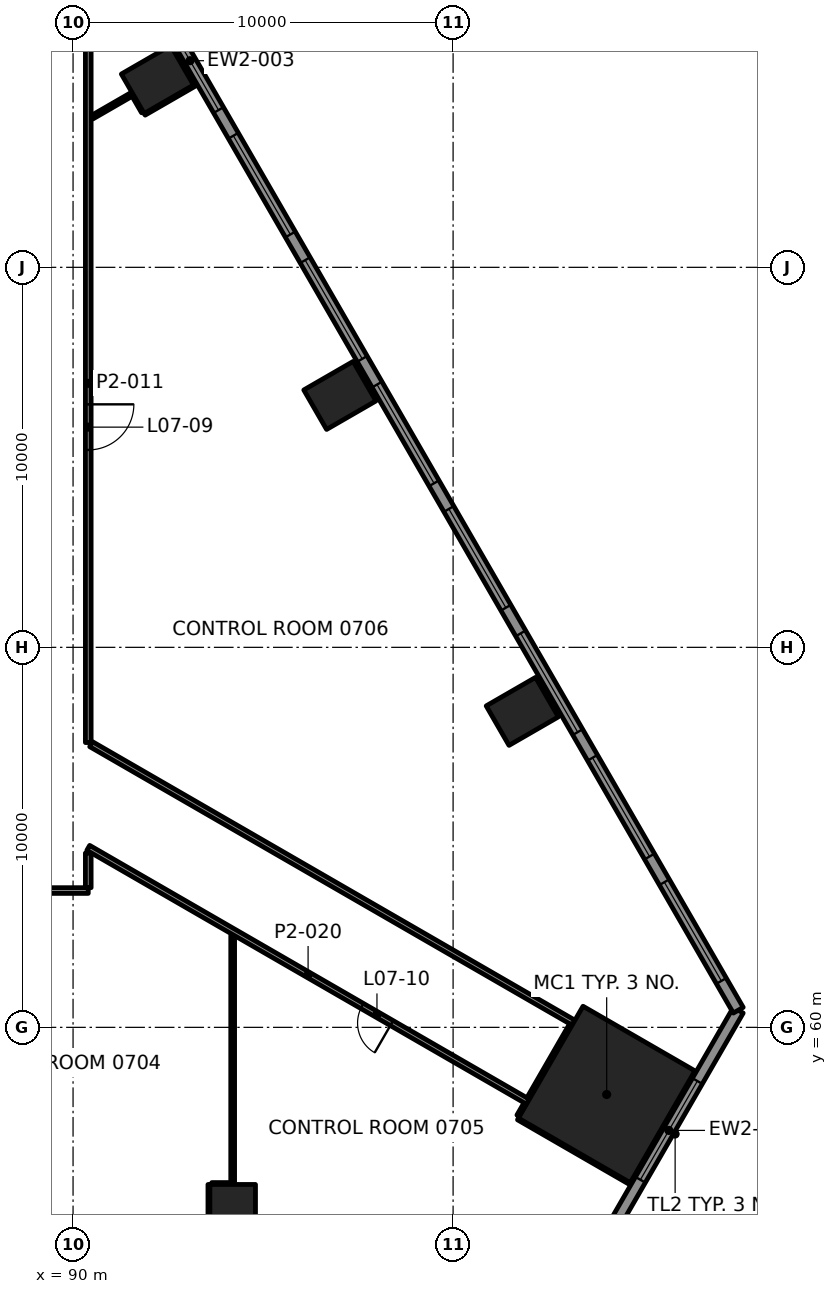
"""IFC4 building model, lengths in metres.
Left out: names, types, materials, properties, quantities, classifications, styles, units other than length and angle.
Written with IfcOpenShell. Run it as: python <this file> out.ifc"""

import sys

from ifc_helpers import new_model, si_unit, direction, frame, frame_2d, origin, origin_2d, place, context, subcontext, project, spatial, rectangle, extrude, element, fill, save


model = new_model("IFC4")
c1 = context("Model", 3, precision=1e-05, world=origin(), true_north=direction((0.0, 1.0)))
c2 = subcontext(c1, "Body", "Model", "MODEL_VIEW")
j1 = project(units=[si_unit("LENGTHUNIT", "METRE"), si_unit("PLANEANGLEUNIT", "RADIAN")], contexts=[c1])
p1 = place(None, origin())
s1 = spatial("IfcSite", under=j1, at=p1, CompositionType="ELEMENT")
p2 = place(p1, origin())
s2 = spatial("IfcBuilding", under=s1, at=p2, CompositionType="ELEMENT")
p3 = place(p2, frame((0.0, 0.0, 35.5)))
s3 = spatial("IfcBuildingStorey", under=s2, at=p3, CompositionType="ELEMENT", Elevation=35.5)
p4 = place(p3, frame((104.041, 58.233, 0.0), z_axis=(0.0, 0.0, 1.0), x_axis=(0.5, 0.866025403784, 0.0)))
e1 = element("IfcColumn", 1, at=p4, inside=s3, PredefinedType="COLUMN", context=c2, shape_type="SweptSolid", body=[
    extrude(rectangle(XDim=3.4, YDim=3.4, at=origin_2d()), origin(), (0.0, 0.0, 1.0), 4.5),
])
for number, where, z_axis, x_axis in (
    (2, (94.2, 55.115, -0.0), (0.0, 0.0, 1.0), (1.0, 0.0, 0.0)),
    (3, (101.821, 68.315, -0.0), (0.0, 0.0, 1.0), (-0.5, 0.866, 0.0)),
    (4, (97.021, 76.628, -0.0), (0.0, 0.0, 1.0), (-0.5, 0.866, 0.0)),
    (5, (92.22, 84.942, -0.0), (0.0, 0.0, 1.0), (-0.5, 0.866, 0.0)),
):
    element("IfcColumn", number, at=place(p3, frame(where, z_axis=z_axis, x_axis=x_axis)), inside=s3, PredefinedType="COLUMN", context=c2, shape_type="SweptSolid", body=[
        extrude(rectangle(XDim=1.2, YDim=1.5, at=origin_2d()), origin(), (0.0, 0.0, 1.0), 4.5),
    ])
p5 = place(p3, frame((93.65, 55.865, 0.0), z_axis=(0.0, 0.0, 1.0), x_axis=(1.0, 0.0, 0.0)))
e6 = element("IfcWall", 6, at=p5, inside=s3, PredefinedType="PARTITIONING", context=c2, shape_type="SweptSolid", body=[
    extrude(rectangle(XDim=0.499, YDim=0.1, at=frame_2d((0.25, 0.0))), origin(), (0.0, 0.0, 1.0), 3.7),
])
p6 = place(p3, frame((90.4, 63.6, 0.0), z_axis=(0.0, 0.0, 1.0), x_axis=(-1.0, 0.0, 0.0)))
e7 = element("IfcWall", 7, at=p6, inside=s3, PredefinedType="PARTITIONING", context=c2, shape_type="SweptSolid", body=[
    extrude(rectangle(XDim=30.799, YDim=0.15, at=frame_2d((15.4, 0.0))), origin(), (0.0, 0.0, 1.0), 3.7),
])
p7 = place(p6, frame((3.751, 0.0, 0.0)))
e8 = element("IfcOpeningElement", 8, at=p7, cuts=e7, PredefinedType="OPENING", context=c2, shape_type="SweptSolid", body=[
    extrude(rectangle(XDim=0.9, YDim=2.1, at=frame_2d((0.45, 1.05))), frame((0.0, 0.085, 0.0), z_axis=(0.0, -1.0, 0.0), x_axis=(1.0, 0.0, 0.0)), (0.0, 0.0, 1.0), 0.17),
])
p8 = place(p6, frame((14.8, 0.0, 0.0)))
e9 = element("IfcOpeningElement", 9, at=p8, cuts=e7, PredefinedType="OPENING", context=c2, shape_type="SweptSolid", body=[
    extrude(rectangle(XDim=1.2, YDim=2.1, at=frame_2d((0.6, 1.05))), frame((0.0, 0.085, 0.0), z_axis=(0.0, -1.0, 0.0), x_axis=(1.0, 0.0, 0.0)), (0.0, 0.0, 1.0), 0.17),
])
p9 = place(p6, frame((25.998, 0.0, 0.0)))
e10 = element("IfcOpeningElement", 10, at=p9, cuts=e7, PredefinedType="OPENING", context=c2, shape_type="SweptSolid", body=[
    extrude(rectangle(XDim=1.2, YDim=2.1, at=frame_2d((0.6, 1.05))), frame((0.0, 0.085, 0.0), z_axis=(0.0, -1.0, 0.0), x_axis=(1.0, 0.0, 0.0)), (0.0, 0.0, 1.0), 0.17),
])
p10 = place(p3, frame((91.871, 84.048, 0.0), z_axis=(0.0, 0.0, 1.0), x_axis=(0.866026058841, 0.499998865407, 0.0)))
e11 = element("IfcWall", 11, at=p10, inside=s3, PredefinedType="PARTITIONING", context=c2, shape_type="SweptSolid", body=[
    extrude(rectangle(XDim=1.708, YDim=0.1, at=frame_2d((0.854, 0.0))), origin(), (0.0, 0.0, 1.0), 3.465),
])
p11 = place(p3, frame((90.501, 83.95, 0.0), z_axis=(0.0, 0.0, 1.0), x_axis=(0.866057204957, 0.499944914708, 0.0)))
e12 = element("IfcWall", 12, at=p11, inside=s3, PredefinedType="PARTITIONING", context=c2, shape_type="SweptSolid", body=[
    extrude(rectangle(XDim=1.235, YDim=0.1, at=frame_2d((0.618, 0.0))), origin(), (0.0, 0.0, 1.0), 3.7),
])
p12 = place(p3, frame((101.744, 57.655, 0.0), z_axis=(0.0, 0.0, 1.0), x_axis=(0.500136362069, 0.865946660792, 0.0)))
e13 = element("IfcWall", 13, at=p12, inside=s3, PredefinedType="PARTITIONING", context=c2, shape_type="SweptSolid", body=[
    extrude(rectangle(XDim=0.375, YDim=0.15, at=frame_2d((0.187, 0.0))), origin(), (0.0, 0.0, 1.0), 3.7),
])
p13 = place(p3, frame((94.2, 55.866, 0.0), z_axis=(0.0, 0.0, 1.0), x_axis=(0.0, 1.0, 0.0)))
e14 = element("IfcWall", 14, at=p13, inside=s3, PredefinedType="PARTITIONING", context=c2, shape_type="SweptSolid", body=[
    extrude(rectangle(XDim=6.547, YDim=0.1, at=frame_2d((3.273, 0.0))), origin(), (0.0, 0.0, 1.0), 3.7),
])
p14 = place(p3, frame((93.6, 54.155, 0.0), z_axis=(0.0, 0.0, 1.0), x_axis=(0.0, 1.0, 0.0)))
e15 = element("IfcWall", 15, at=p14, inside=s3, PredefinedType="PARTITIONING", context=c2, shape_type="SweptSolid", body=[
    extrude(rectangle(XDim=1.71, YDim=0.1, at=frame_2d((0.855, 0.0))), origin(), (0.0, 0.0, 1.0), 3.7),
])
p15 = place(p3, frame((90.4, 63.675, 0.0), z_axis=(0.0, 0.0, 1.0), x_axis=(0.0, 1.0, 0.0)))
e16 = element("IfcWall", 16, at=p15, inside=s3, PredefinedType="PARTITIONING", context=c2, shape_type="SweptSolid", body=[
    extrude(rectangle(XDim=0.912, YDim=0.15, at=frame_2d((0.456, 0.0))), origin(), (0.0, 0.0, 1.0), 3.7),
])
p16 = place(p3, frame((90.4, 86.399, 0.0), z_axis=(0.0, 0.0, 1.0), x_axis=(0.0, -1.0, 0.0)))
e17 = element("IfcWall", 17, at=p16, inside=s3, PredefinedType="PARTITIONING", context=c2, shape_type="SweptSolid", body=[
    extrude(rectangle(XDim=18.905, YDim=0.15, at=frame_2d((9.453, 0.0))), origin(), (0.0, 0.0, 1.0), 3.7),
])
p17 = place(p16, frame((10.005, 0.0, 0.0)))
e18 = element("IfcOpeningElement", 18, at=p17, cuts=e17, PredefinedType="OPENING", context=c2, shape_type="SweptSolid", body=[
    extrude(rectangle(XDim=1.2, YDim=2.1, at=frame_2d((0.6, 1.05))), frame((0.0, 0.085, 0.0), z_axis=(0.0, -1.0, 0.0), x_axis=(1.0, 0.0, 0.0)), (0.0, 0.0, 1.0), 0.17),
])
p18 = place(p3, frame((91.846, 84.092, 0.0), z_axis=(0.0, 0.0, 1.0), x_axis=(-0.500244977835, 0.865883919559, 0.0)))
e19 = element("IfcWall", 19, at=p18, inside=s3, PredefinedType="PARTITIONING", context=c2, shape_type="SweptSolid", body=[
    extrude(rectangle(XDim=0.499, YDim=0.1, at=frame_2d((0.25, 0.0))), origin(), (0.0, 0.0, 1.0), 3.7),
])
p19 = place(p3, frame((103.168, 60.123, 0.0), z_axis=(0.0, 0.0, 1.0), x_axis=(-0.866022484069, 0.500005057062, 0.0)))
e20 = element("IfcWall", 20, at=p19, inside=s3, PredefinedType="PARTITIONING", context=c2, shape_type="SweptSolid", body=[
    extrude(rectangle(XDim=14.657, YDim=0.15, at=frame_2d((7.329, 0.0))), origin(), (0.0, 0.0, 1.0), 3.7),
])
p20 = place(p3, frame((101.969, 58.044, 0.0), z_axis=(0.0, 0.0, 1.0), x_axis=(-0.866027935033, 0.499995615723, 0.0)))
e21 = element("IfcWall", 21, at=p20, inside=s3, PredefinedType="PARTITIONING", context=c2, shape_type="SweptSolid", body=[
    extrude(rectangle(XDim=13.358, YDim=0.15, at=frame_2d((6.679, 0.0))), origin(), (0.0, 0.0, 1.0), 3.547),
])
p21 = place(p20, frame((4.137, 0.0, 0.0)))
e22 = element("IfcOpeningElement", 22, at=p21, cuts=e21, PredefinedType="OPENING", context=c2, shape_type="SweptSolid", body=[
    extrude(rectangle(XDim=0.9, YDim=2.1, at=frame_2d((0.45, 1.05))), frame((0.0, 0.085, 0.0), z_axis=(0.0, -1.0, 0.0), x_axis=(1.0, 0.0, 0.0)), (0.0, 0.0, 1.0), 0.17),
])
p22 = place(p3, frame((104.802, 55.831, 0.0), z_axis=(0.0, 0.0, 1.0), x_axis=(-0.866014251095, 0.500019316528, 0.0)))
e23 = element("IfcWall", 23, at=p22, inside=s3, PredefinedType="PARTITIONING", context=c2, shape_type="SweptSolid", body=[
    extrude(rectangle(XDim=3.559, YDim=0.1, at=frame_2d((1.78, 0.0))), origin(), (0.0, 0.0, 1.0), 3.7),
])
p23 = place(p3, frame((102.007, 58.109, 0.0), z_axis=(0.0, 0.0, 1.0), x_axis=(0.499979232204, 0.866037393745, 0.0)))
e24 = element("IfcWall", 24, at=p23, inside=s3, PredefinedType="PARTITIONING", context=c2, shape_type="SweptSolid", body=[
    extrude(rectangle(XDim=2.25, YDim=0.15, at=frame_2d((1.125, 0.0))), origin(), (0.0, 0.0, 1.0), 3.547),
])
p24 = place(p3, frame((103.852, 54.125, 0.0), z_axis=(0.0, 0.0, 1.0), x_axis=(0.500000231294, 0.866025270247, 0.0)))
e25 = element("IfcWall", 25, at=p24, inside=s3, PredefinedType="SOLIDWALL", context=c2, shape_type="SweptSolid", body=[
    extrude(rectangle(XDim=7.304, YDim=0.3, at=frame_2d((3.652, 0.0))), origin(), (0.0, 0.0, 1.0), 4.3),
])
p25 = place(p24, frame((2.152, 0.0, 0.8)))
e26 = element("IfcOpeningElement", 26, at=p25, cuts=e25, PredefinedType="OPENING", context=c2, shape_type="SweptSolid", body=[
    extrude(rectangle(XDim=3.0, YDim=2.4, at=frame_2d((1.5, 1.2))), frame((0.0, 0.16, 0.0), z_axis=(0.0, -1.0, 0.0), x_axis=(1.0, 0.0, 0.0)), (0.0, 0.0, 1.0), 0.32),
])
p26 = place(p3, frame((107.504, 60.451, 0.0), z_axis=(0.0, 0.0, 1.0), x_axis=(-0.500000550228, 0.86602508611, 0.0)))
e27 = element("IfcWall", 27, at=p26, inside=s3, PredefinedType="SOLIDWALL", context=c2, shape_type="SweptSolid", body=[
    extrude(rectangle(XDim=57.704, YDim=0.3, at=frame_2d((28.852, 0.0))), origin(), (0.0, 0.0, 1.0), 4.3),
])
p27 = place(p26, frame((0.89, 0.0, 0.8)))
e28 = element("IfcOpeningElement", 28, at=p27, cuts=e27, PredefinedType="OPENING", context=c2, shape_type="SweptSolid", body=[
    extrude(rectangle(XDim=3.0, YDim=2.4, at=frame_2d((1.5, 1.2))), frame((0.0, 0.16, 0.0), z_axis=(0.0, -1.0, 0.0), x_axis=(1.0, 0.0, 0.0)), (0.0, 0.0, 1.0), 0.32),
])
p28 = place(p26, frame((4.67, 0.0, 0.8)))
e29 = element("IfcOpeningElement", 29, at=p28, cuts=e27, PredefinedType="OPENING", context=c2, shape_type="SweptSolid", body=[
    extrude(rectangle(XDim=3.0, YDim=2.4, at=frame_2d((1.5, 1.2))), frame((0.0, 0.16, 0.0), z_axis=(0.0, -1.0, 0.0), x_axis=(1.0, 0.0, 0.0)), (0.0, 0.0, 1.0), 0.32),
])
p29 = place(p26, frame((8.451, 0.0, 0.8)))
e30 = element("IfcOpeningElement", 30, at=p29, cuts=e27, PredefinedType="OPENING", context=c2, shape_type="SweptSolid", body=[
    extrude(rectangle(XDim=3.0, YDim=2.4, at=frame_2d((1.5, 1.2))), frame((0.0, 0.16, 0.0), z_axis=(0.0, -1.0, 0.0), x_axis=(1.0, 0.0, 0.0)), (0.0, 0.0, 1.0), 0.32),
])
p30 = place(p26, frame((12.231, 0.0, 0.8)))
e31 = element("IfcOpeningElement", 31, at=p30, cuts=e27, PredefinedType="OPENING", context=c2, shape_type="SweptSolid", body=[
    extrude(rectangle(XDim=3.0, YDim=2.4, at=frame_2d((1.5, 1.2))), frame((0.0, 0.16, 0.0), z_axis=(0.0, -1.0, 0.0), x_axis=(1.0, 0.0, 0.0)), (0.0, 0.0, 1.0), 0.32),
])
p31 = place(p26, frame((16.011, 0.0, 0.8)))
e32 = element("IfcOpeningElement", 32, at=p31, cuts=e27, PredefinedType="OPENING", context=c2, shape_type="SweptSolid", body=[
    extrude(rectangle(XDim=3.0, YDim=2.4, at=frame_2d((1.5, 1.2))), frame((0.0, 0.16, 0.0), z_axis=(0.0, -1.0, 0.0), x_axis=(1.0, 0.0, 0.0)), (0.0, 0.0, 1.0), 0.32),
])
p32 = place(p26, frame((19.792, 0.0, 0.8)))
e33 = element("IfcOpeningElement", 33, at=p32, cuts=e27, PredefinedType="OPENING", context=c2, shape_type="SweptSolid", body=[
    extrude(rectangle(XDim=3.0, YDim=2.4, at=frame_2d((1.5, 1.2))), frame((0.0, 0.16, 0.0), z_axis=(0.0, -1.0, 0.0), x_axis=(1.0, 0.0, 0.0)), (0.0, 0.0, 1.0), 0.32),
])
p33 = place(p26, frame((23.572, 0.0, 0.8)))
e34 = element("IfcOpeningElement", 34, at=p33, cuts=e27, PredefinedType="OPENING", context=c2, shape_type="SweptSolid", body=[
    extrude(rectangle(XDim=3.0, YDim=2.4, at=frame_2d((1.5, 1.2))), frame((0.0, 0.16, 0.0), z_axis=(0.0, -1.0, 0.0), x_axis=(1.0, 0.0, 0.0)), (0.0, 0.0, 1.0), 0.32),
])
p34 = place(p26, frame((27.352, 0.0, 0.8)))
e35 = element("IfcOpeningElement", 35, at=p34, cuts=e27, PredefinedType="OPENING", context=c2, shape_type="SweptSolid", body=[
    extrude(rectangle(XDim=3.0, YDim=2.4, at=frame_2d((1.5, 1.2))), frame((0.0, 0.16, 0.0), z_axis=(0.0, -1.0, 0.0), x_axis=(1.0, 0.0, 0.0)), (0.0, 0.0, 1.0), 0.32),
])
p35 = place(p26, frame((31.132, 0.0, 0.8)))
e36 = element("IfcOpeningElement", 36, at=p35, cuts=e27, PredefinedType="OPENING", context=c2, shape_type="SweptSolid", body=[
    extrude(rectangle(XDim=3.0, YDim=2.4, at=frame_2d((1.5, 1.2))), frame((0.0, 0.16, 0.0), z_axis=(0.0, -1.0, 0.0), x_axis=(1.0, 0.0, 0.0)), (0.0, 0.0, 1.0), 0.32),
])
p36 = place(p26, frame((34.913, 0.0, 0.8)))
e37 = element("IfcOpeningElement", 37, at=p36, cuts=e27, PredefinedType="OPENING", context=c2, shape_type="SweptSolid", body=[
    extrude(rectangle(XDim=3.0, YDim=2.4, at=frame_2d((1.5, 1.2))), frame((0.0, 0.16, 0.0), z_axis=(0.0, -1.0, 0.0), x_axis=(1.0, 0.0, 0.0)), (0.0, 0.0, 1.0), 0.32),
])
p37 = place(p26, frame((38.693, 0.0, 0.8)))
e38 = element("IfcOpeningElement", 38, at=p37, cuts=e27, PredefinedType="OPENING", context=c2, shape_type="SweptSolid", body=[
    extrude(rectangle(XDim=3.0, YDim=2.4, at=frame_2d((1.5, 1.2))), frame((0.0, 0.16, 0.0), z_axis=(0.0, -1.0, 0.0), x_axis=(1.0, 0.0, 0.0)), (0.0, 0.0, 1.0), 0.32),
])
p38 = place(p26, frame((42.473, 0.0, 0.8)))
e39 = element("IfcOpeningElement", 39, at=p38, cuts=e27, PredefinedType="OPENING", context=c2, shape_type="SweptSolid", body=[
    extrude(rectangle(XDim=3.0, YDim=2.4, at=frame_2d((1.5, 1.2))), frame((0.0, 0.16, 0.0), z_axis=(0.0, -1.0, 0.0), x_axis=(1.0, 0.0, 0.0)), (0.0, 0.0, 1.0), 0.32),
])
p39 = place(p26, frame((46.253, 0.0, 0.8)))
e40 = element("IfcOpeningElement", 40, at=p39, cuts=e27, PredefinedType="OPENING", context=c2, shape_type="SweptSolid", body=[
    extrude(rectangle(XDim=3.0, YDim=2.4, at=frame_2d((1.5, 1.2))), frame((0.0, 0.16, 0.0), z_axis=(0.0, -1.0, 0.0), x_axis=(1.0, 0.0, 0.0)), (0.0, 0.0, 1.0), 0.32),
])
p40 = place(p26, frame((50.033, 0.0, 0.8)))
e41 = element("IfcOpeningElement", 41, at=p40, cuts=e27, PredefinedType="OPENING", context=c2, shape_type="SweptSolid", body=[
    extrude(rectangle(XDim=3.0, YDim=2.4, at=frame_2d((1.5, 1.2))), frame((0.0, 0.16, 0.0), z_axis=(0.0, -1.0, 0.0), x_axis=(1.0, 0.0, 0.0)), (0.0, 0.0, 1.0), 0.32),
])
p41 = place(p26, frame((53.814, 0.0, 0.8)))
e42 = element("IfcOpeningElement", 42, at=p41, cuts=e27, PredefinedType="OPENING", context=c2, shape_type="SweptSolid", body=[
    extrude(rectangle(XDim=3.0, YDim=2.4, at=frame_2d((1.5, 1.2))), frame((0.0, 0.16, 0.0), z_axis=(0.0, -1.0, 0.0), x_axis=(1.0, 0.0, 0.0)), (0.0, 0.0, 1.0), 0.32),
])
p42 = place(p17, origin())
e43 = element("IfcDoor", 43, at=p42, inside=s3, OperationType="DOUBLE_DOOR_SINGLE_SWING", PredefinedType="DOOR", context=c2, shape_type="SweptSolid", body=[
    extrude(rectangle(XDim=1.2, YDim=2.1, at=frame_2d((0.6, 1.05))), frame((0.0, 0.025, 0.0), z_axis=(0.0, -1.0, 0.0), x_axis=(1.0, 0.0, 0.0)), (0.0, 0.0, 1.0), 0.05),
])
fill(e18, e43)
p43 = place(p21, origin())
e44 = element("IfcDoor", 44, at=p43, inside=s3, OperationType="SINGLE_SWING_RIGHT", PredefinedType="DOOR", context=c2, shape_type="SweptSolid", body=[
    extrude(rectangle(XDim=0.9, YDim=2.1, at=frame_2d((0.45, 1.05))), frame((0.0, 0.025, 0.0), z_axis=(0.0, -1.0, 0.0), x_axis=(1.0, 0.0, 0.0)), (0.0, 0.0, 1.0), 0.05),
])
fill(e22, e44)
p44 = place(p25, origin())
e45 = element("IfcWindow", 45, at=p44, inside=s3, PartitioningType="SINGLE_PANEL", PredefinedType="WINDOW", context=c2, shape_type="SweptSolid", body=[
    extrude(rectangle(XDim=3.0, YDim=2.4, at=frame_2d((1.5, 1.2))), frame((0.0, 0.03, 0.0), z_axis=(0.0, -1.0, 0.0), x_axis=(1.0, 0.0, 0.0)), (0.0, 0.0, 1.0), 0.06),
])
fill(e26, e45)
p45 = place(p27, origin())
e46 = element("IfcWindow", 46, at=p45, inside=s3, PartitioningType="SINGLE_PANEL", PredefinedType="WINDOW", context=c2, shape_type="SweptSolid", body=[
    extrude(rectangle(XDim=3.0, YDim=2.4, at=frame_2d((1.5, 1.2))), frame((0.0, 0.03, 0.0), z_axis=(0.0, -1.0, 0.0), x_axis=(1.0, 0.0, 0.0)), (0.0, 0.0, 1.0), 0.06),
])
fill(e28, e46)
p46 = place(p28, origin())
e47 = element("IfcWindow", 47, at=p46, inside=s3, PartitioningType="SINGLE_PANEL", PredefinedType="WINDOW", context=c2, shape_type="SweptSolid", body=[
    extrude(rectangle(XDim=3.0, YDim=2.4, at=frame_2d((1.5, 1.2))), frame((0.0, 0.03, 0.0), z_axis=(0.0, -1.0, 0.0), x_axis=(1.0, 0.0, 0.0)), (0.0, 0.0, 1.0), 0.06),
])
fill(e29, e47)
p47 = place(p29, origin())
e48 = element("IfcWindow", 48, at=p47, inside=s3, PartitioningType="SINGLE_PANEL", PredefinedType="WINDOW", context=c2, shape_type="SweptSolid", body=[
    extrude(rectangle(XDim=3.0, YDim=2.4, at=frame_2d((1.5, 1.2))), frame((0.0, 0.03, 0.0), z_axis=(0.0, -1.0, 0.0), x_axis=(1.0, 0.0, 0.0)), (0.0, 0.0, 1.0), 0.06),
])
fill(e30, e48)
p48 = place(p30, origin())
e49 = element("IfcWindow", 49, at=p48, inside=s3, PartitioningType="SINGLE_PANEL", PredefinedType="WINDOW", context=c2, shape_type="SweptSolid", body=[
    extrude(rectangle(XDim=3.0, YDim=2.4, at=frame_2d((1.5, 1.2))), frame((0.0, 0.03, 0.0), z_axis=(0.0, -1.0, 0.0), x_axis=(1.0, 0.0, 0.0)), (0.0, 0.0, 1.0), 0.06),
])
fill(e31, e49)
p49 = place(p31, origin())
e50 = element("IfcWindow", 50, at=p49, inside=s3, PartitioningType="SINGLE_PANEL", PredefinedType="WINDOW", context=c2, shape_type="SweptSolid", body=[
    extrude(rectangle(XDim=3.0, YDim=2.4, at=frame_2d((1.5, 1.2))), frame((0.0, 0.03, 0.0), z_axis=(0.0, -1.0, 0.0), x_axis=(1.0, 0.0, 0.0)), (0.0, 0.0, 1.0), 0.06),
])
fill(e32, e50)
p50 = place(p32, origin())
e51 = element("IfcWindow", 51, at=p50, inside=s3, PartitioningType="SINGLE_PANEL", PredefinedType="WINDOW", context=c2, shape_type="SweptSolid", body=[
    extrude(rectangle(XDim=3.0, YDim=2.4, at=frame_2d((1.5, 1.2))), frame((0.0, 0.03, 0.0), z_axis=(0.0, -1.0, 0.0), x_axis=(1.0, 0.0, 0.0)), (0.0, 0.0, 1.0), 0.06),
])
fill(e33, e51)
p51 = place(p33, origin())
e52 = element("IfcWindow", 52, at=p51, inside=s3, PartitioningType="SINGLE_PANEL", PredefinedType="WINDOW", context=c2, shape_type="SweptSolid", body=[
    extrude(rectangle(XDim=3.0, YDim=2.4, at=frame_2d((1.5, 1.2))), frame((0.0, 0.03, 0.0), z_axis=(0.0, -1.0, 0.0), x_axis=(1.0, 0.0, 0.0)), (0.0, 0.0, 1.0), 0.06),
])
fill(e34, e52)
p52 = place(p34, origin())
e53 = element("IfcWindow", 53, at=p52, inside=s3, PartitioningType="SINGLE_PANEL", PredefinedType="WINDOW", context=c2, shape_type="SweptSolid", body=[
    extrude(rectangle(XDim=3.0, YDim=2.4, at=frame_2d((1.5, 1.2))), frame((0.0, 0.03, 0.0), z_axis=(0.0, -1.0, 0.0), x_axis=(1.0, 0.0, 0.0)), (0.0, 0.0, 1.0), 0.06),
])
fill(e35, e53)
save(model, sys.argv[1])
